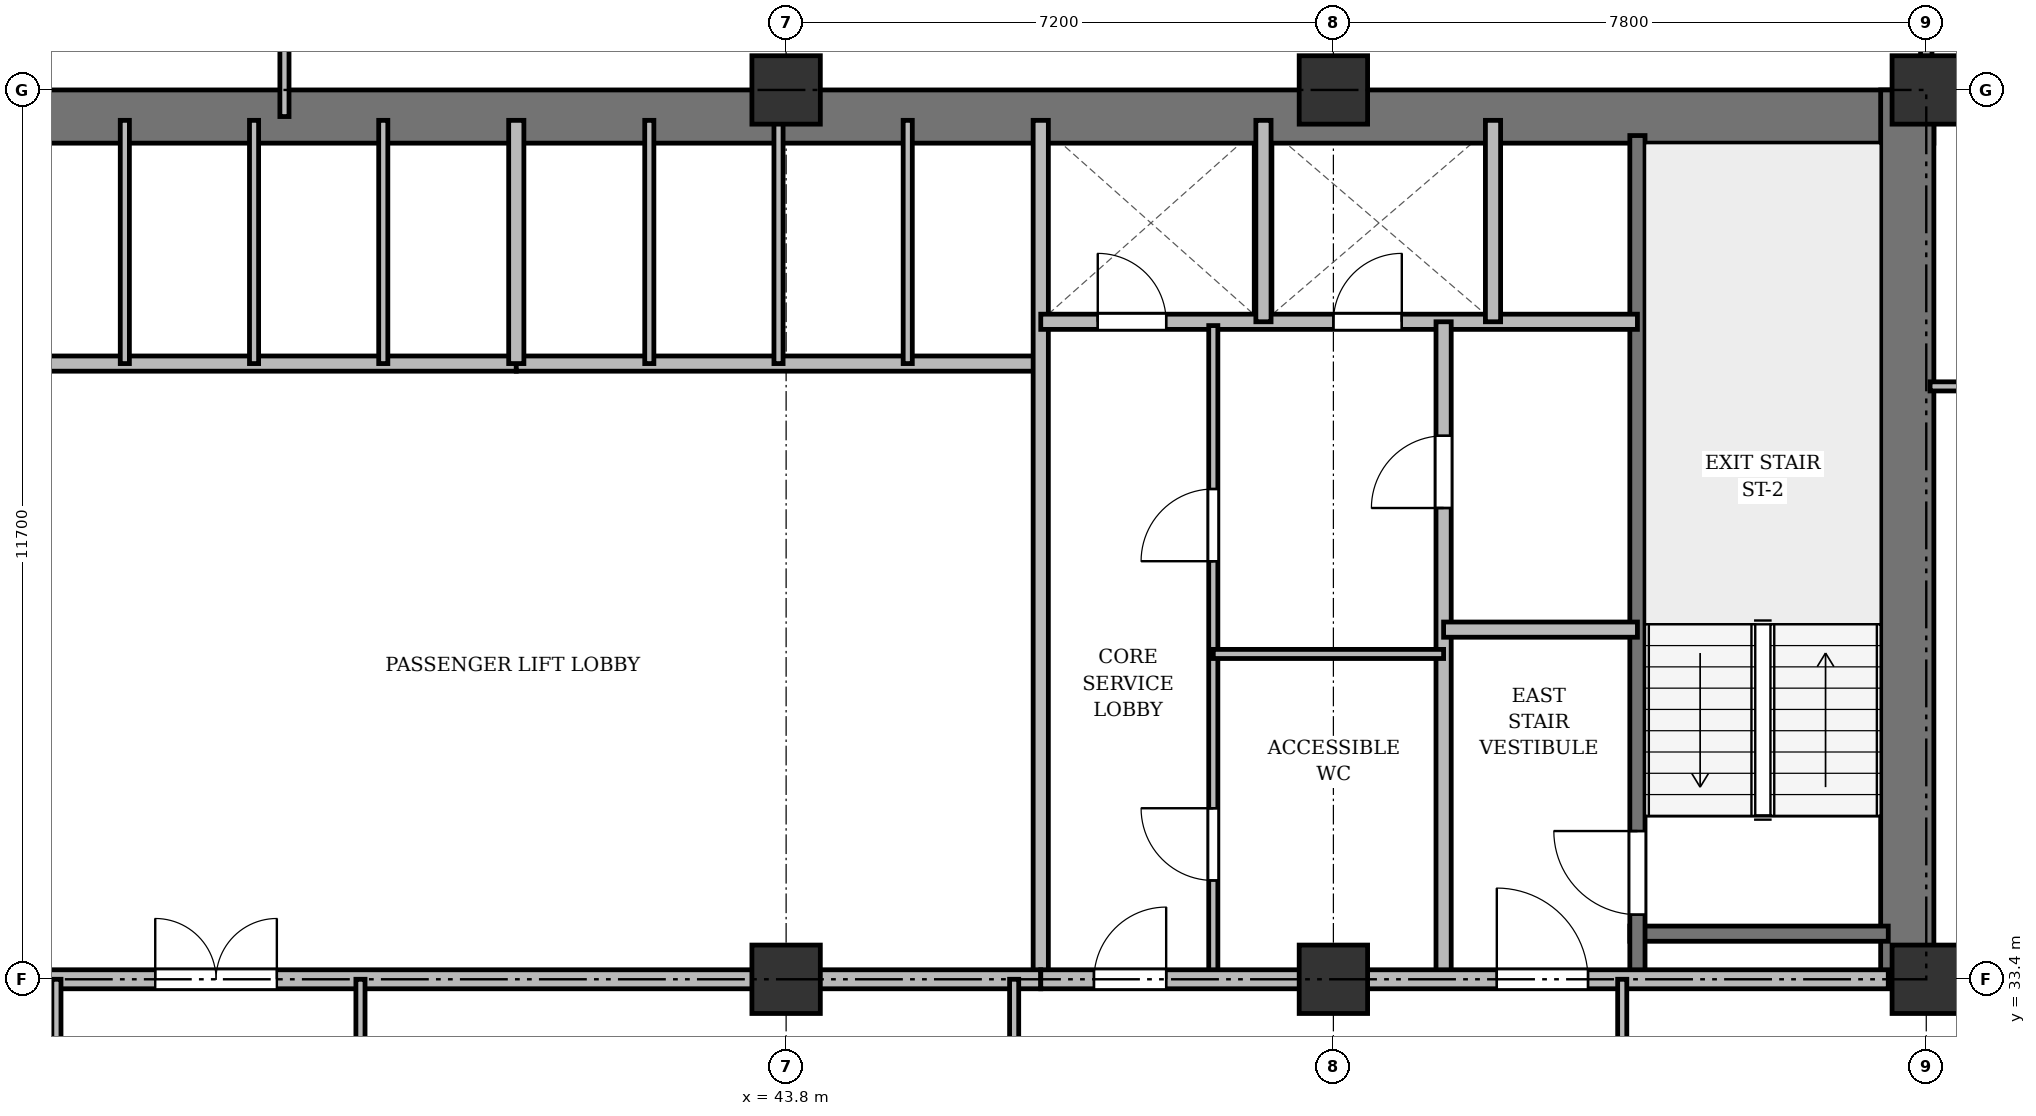
"""IFC4 building model, lengths in metres.
Left out: names, types, materials, properties, quantities, classifications, styles, units other than length and angle.
Written with IfcOpenShell. Run it as: python <this file> out.ifc"""

import sys

from ifc_helpers import new_model, si_unit, direction, frame, frame_2d, origin, origin_2d, place, context, subcontext, project, spatial, rectangle, extrude, source, transform, mapped, element, fill, save


model = new_model("IFC4")
c1 = context("Model", 3, precision=1e-05, world=origin(), true_north=direction((0.0, 1.0)))
c2 = subcontext(c1, "Body", "Model", "MODEL_VIEW")
j1 = project(units=[si_unit("LENGTHUNIT", "METRE"), si_unit("PLANEANGLEUNIT", "RADIAN")], contexts=[c1])
p1 = place(None, origin())
s1 = spatial("IfcSite", under=j1, at=p1, CompositionType="ELEMENT")
p2 = place(p1, origin())
s2 = spatial("IfcBuilding", under=s1, at=p2, CompositionType="ELEMENT")
p3 = place(p2, frame((0.0, 0.0, 70.3)))
s3 = spatial("IfcBuildingStorey", under=s2, at=p3, CompositionType="ELEMENT", Elevation=70.3)
m1 = source(origin(), c2, "Body", "SweptSolid", [
    extrude(rectangle(XDim=0.9, YDim=0.9, at=origin_2d()), origin(), (0.0, 0.0, 1.0), 3.6),
])
for number, where, z_axis, x_axis in (
    (1, (43.8, 33.4, 0.0), (0.0, 0.0, 1.0), (1.0, 0.0, 0.0)),
    (2, (43.8, 45.1, 0.0), (0.0, 0.0, 1.0), (1.0, 0.0, 0.0)),
    (3, (51.0, 33.4, 0.0), (0.0, 0.0, 1.0), (1.0, 0.0, 0.0)),
    (4, (51.0, 45.1, 0.0), (0.0, 0.0, 1.0), (1.0, 0.0, 0.0)),
    (5, (58.8, 33.4, 0.0), (0.0, 0.0, 1.0), (1.0, 0.0, 0.0)),
    (6, (58.8, 45.1, 0.0), (0.0, 0.0, 1.0), (1.0, 0.0, 0.0)),
):
    element("IfcColumn", number, at=place(p3, frame(where, z_axis=z_axis, x_axis=x_axis)), inside=s3, PredefinedType="COLUMN", context=c2, shape_type="MappedRepresentation", body=[
        mapped(m1, transform((0.0, 0.0, 0.0), x_axis=(1.0, 0.0, 0.0), y_axis=(0.0, 1.0, 0.0), z_axis=(0.0, 0.0, 1.0), scale=1.0)),
    ])
p4 = place(p3, frame((15.5, 44.75, 0.0), z_axis=(0.0, 0.0, 1.0), x_axis=(1.0, 0.0, 0.0)))
e7 = element("IfcWall", 7, at=p4, inside=s3, PredefinedType="SHEAR", context=c2, shape_type="SweptSolid", body=[
    extrude(rectangle(XDim=43.4, YDim=0.7, at=frame_2d((21.7, 0.0))), origin(), (0.0, 0.0, 1.0), 3.22),
])
p5 = place(p3, frame((58.55, 33.4, 0.0), z_axis=(0.0, 0.0, 1.0), x_axis=(0.0, 1.0, 0.0)))
e8 = element("IfcWall", 8, at=p5, inside=s3, PredefinedType="SHEAR", context=c2, shape_type="SweptSolid", body=[
    extrude(rectangle(XDim=11.7, YDim=0.7, at=frame_2d((5.85, 0.0))), origin(), (0.0, 0.0, 1.0), 3.22),
])
p6 = place(p3, frame((54.9, 34.0, 0.0), z_axis=(0.0, 0.0, 1.0), x_axis=(1.0, 0.0, 0.0)))
e9 = element("IfcWall", 9, at=p6, inside=s3, PredefinedType="SHEAR", context=c2, shape_type="SweptSolid", body=[
    extrude(rectangle(XDim=3.4, YDim=0.2, at=frame_2d((1.7, 0.0))), origin(), (0.0, 0.0, 1.0), 3.22),
])
p7 = place(p3, frame((55.0, 33.4, 0.0), z_axis=(0.0, 0.0, 1.0), x_axis=(0.0, 1.0, 0.0)))
e10 = element("IfcWall", 10, at=p7, inside=s3, PredefinedType="SHEAR", context=c2, shape_type="SweptSolid", body=[
    extrude(rectangle(XDim=11.1, YDim=0.2, at=frame_2d((5.55, 0.0))), origin(), (0.0, 0.0, 1.0), 3.22),
])
p8 = place(p7, frame((0.85, 0.0, 0.0)))
e11 = element("IfcOpeningElement", 11, at=p8, cuts=e10, PredefinedType="OPENING", context=c2, shape_type="SweptSolid", body=[
    extrude(rectangle(XDim=1.1, YDim=2.15, at=frame_2d((0.55, 1.075))), frame((0.0, 0.11, 0.0), z_axis=(0.0, -1.0, 0.0), x_axis=(1.0, 0.0, 0.0)), (0.0, 0.0, 1.0), 0.22),
])
p9 = place(p3, frame((33.35, 41.5, 0.0), z_axis=(0.0, 0.0, 1.0), x_axis=(1.0, 0.0, 0.0)))
e12 = element("IfcWall", 12, at=p9, inside=s3, PredefinedType="SOLIDWALL", context=c2, shape_type="SweptSolid", body=[
    extrude(rectangle(XDim=6.9, YDim=0.2, at=frame_2d((3.45, 0.0))), origin(), (0.0, 0.0, 1.0), 3.22),
])
for number, where, z_axis, x_axis in (
    (13, (35.1, 41.5, 0.0), (0.0, 0.0, 1.0), (0.0, 1.0, 0.0)),
    (14, (36.8, 41.5, 0.0), (0.0, 0.0, 1.0), (0.0, 1.0, 0.0)),
    (15, (38.5, 41.5, 0.0), (0.0, 0.0, 1.0), (0.0, 1.0, 0.0)),
):
    element("IfcWall", number, at=place(p3, frame(where, z_axis=z_axis, x_axis=x_axis)), inside=s3, PredefinedType="PARTITIONING", context=c2, shape_type="SweptSolid", body=[
        extrude(rectangle(XDim=3.2, YDim=0.12, at=frame_2d((1.6, 0.0))), origin(), (0.0, 0.0, 1.0), 3.22),
    ])
p10 = place(p3, frame((40.25, 41.5, 0.0), z_axis=(0.0, 0.0, 1.0), x_axis=(1.0, 0.0, 0.0)))
e16 = element("IfcWall", 16, at=p10, inside=s3, PredefinedType="SOLIDWALL", context=c2, shape_type="SweptSolid", body=[
    extrude(rectangle(XDim=6.9, YDim=0.2, at=frame_2d((3.45, 0.0))), origin(), (0.0, 0.0, 1.0), 2.632),
])
p11 = place(p3, frame((40.25, 41.5, 0.0), z_axis=(0.0, 0.0, 1.0), x_axis=(0.0, 1.0, 0.0)))
e17 = element("IfcWall", 17, at=p11, inside=s3, PredefinedType="SOLIDWALL", context=c2, shape_type="SweptSolid", body=[
    extrude(rectangle(XDim=3.2, YDim=0.2, at=frame_2d((1.6, 0.0))), origin(), (0.0, 0.0, 1.0), 3.22),
])
p12 = place(p3, frame((42.0, 41.5, 0.0), z_axis=(0.0, 0.0, 1.0), x_axis=(0.0, 1.0, 0.0)))
e18 = element("IfcWall", 18, at=p12, inside=s3, PredefinedType="PARTITIONING", context=c2, shape_type="SweptSolid", body=[
    extrude(rectangle(XDim=3.2, YDim=0.12, at=frame_2d((1.6, 0.0))), origin(), (0.0, 0.0, 1.0), 3.22),
])
p13 = place(p3, frame((43.7, 41.5, 0.0), z_axis=(0.0, 0.0, 1.0), x_axis=(0.0, 1.0, 0.0)))
e19 = element("IfcWall", 19, at=p13, inside=s3, PredefinedType="PARTITIONING", context=c2, shape_type="SweptSolid", body=[
    extrude(rectangle(XDim=3.2, YDim=0.12, at=frame_2d((1.6, 0.0))), origin(), (0.0, 0.0, 1.0), 2.632),
])
p14 = place(p3, frame((45.4, 41.5, 0.0), z_axis=(0.0, 0.0, 1.0), x_axis=(0.0, 1.0, 0.0)))
e20 = element("IfcWall", 20, at=p14, inside=s3, PredefinedType="PARTITIONING", context=c2, shape_type="SweptSolid", body=[
    extrude(rectangle(XDim=3.2, YDim=0.12, at=frame_2d((1.6, 0.0))), origin(), (0.0, 0.0, 1.0), 3.22),
])
p15 = place(p3, frame((47.15, 33.4, 0.0), z_axis=(0.0, 0.0, 1.0), x_axis=(0.0, 1.0, 0.0)))
e21 = element("IfcWall", 21, at=p15, inside=s3, PredefinedType="SOLIDWALL", context=c2, shape_type="SweptSolid", body=[
    extrude(rectangle(XDim=11.3, YDim=0.2, at=frame_2d((5.65, 0.0))), origin(), (0.0, 0.0, 1.0), 2.57),
])
p16 = place(p3, frame((26.3, 33.4, 0.0), z_axis=(0.0, 0.0, 1.0), x_axis=(1.0, 0.0, 0.0)))
e22 = element("IfcWall", 22, at=p16, inside=s3, PredefinedType="PARTITIONING", context=c2, shape_type="SweptSolid", body=[
    extrude(rectangle(XDim=20.85, YDim=0.25, at=frame_2d((10.425, 0.0))), origin(), (0.0, 0.0, 1.0), 2.57),
])
p17 = place(p16, frame((9.2, 0.0, 0.0)))
e23 = element("IfcOpeningElement", 23, at=p17, cuts=e22, PredefinedType="OPENING", context=c2, shape_type="SweptSolid", body=[
    extrude(rectangle(XDim=1.6, YDim=2.2, at=frame_2d((0.8, 1.1))), frame((0.0, 0.135, 0.0), z_axis=(0.0, -1.0, 0.0), x_axis=(1.0, 0.0, 0.0)), (0.0, 0.0, 1.0), 0.27),
])
p18 = place(p3, frame((47.15, 42.05, 0.0), z_axis=(0.0, 0.0, 1.0), x_axis=(1.0, 0.0, 0.0)))
e24 = element("IfcWall", 24, at=p18, inside=s3, PredefinedType="SOLIDWALL", context=c2, shape_type="SweptSolid", body=[
    extrude(rectangle(XDim=7.85, YDim=0.2, at=frame_2d((3.925, 0.0))), origin(), (0.0, 0.0, 1.0), 2.632),
])
p19 = place(p18, frame((0.75, 0.0, 0.0)))
e25 = element("IfcOpeningElement", 25, at=p19, cuts=e24, PredefinedType="OPENING", context=c2, shape_type="SweptSolid", body=[
    extrude(rectangle(XDim=0.9, YDim=2.1, at=frame_2d((0.45, 1.05))), frame((0.0, 0.11, 0.0), z_axis=(0.0, -1.0, 0.0), x_axis=(1.0, 0.0, 0.0)), (0.0, 0.0, 1.0), 0.22),
])
p20 = place(p18, frame((3.85, 0.0, 0.0)))
e26 = element("IfcOpeningElement", 26, at=p20, cuts=e24, PredefinedType="OPENING", context=c2, shape_type="SweptSolid", body=[
    extrude(rectangle(XDim=0.9, YDim=2.1, at=frame_2d((0.45, 1.05))), frame((0.0, 0.11, 0.0), z_axis=(0.0, -1.0, 0.0), x_axis=(1.0, 0.0, 0.0)), (0.0, 0.0, 1.0), 0.22),
])
for number, where, z_axis, x_axis in (
    (27, (50.08, 42.05, 0.0), (0.0, 0.0, 1.0), (0.0, 1.0, 0.0)),
    (28, (53.1, 42.05, 0.0), (0.0, 0.0, 1.0), (0.0, 1.0, 0.0)),
):
    element("IfcWall", number, at=place(p3, frame(where, z_axis=z_axis, x_axis=x_axis)), inside=s3, PredefinedType="SOLIDWALL", context=c2, shape_type="SweptSolid", body=[
        extrude(rectangle(XDim=2.65, YDim=0.2, at=frame_2d((1.325, 0.0))), origin(), (0.0, 0.0, 1.0), 3.22),
    ])
p21 = place(p3, frame((52.45, 33.4, 0.0), z_axis=(0.0, 0.0, 1.0), x_axis=(0.0, 1.0, 0.0)))
e29 = element("IfcWall", 29, at=p21, inside=s3, PredefinedType="PARTITIONING", context=c2, shape_type="SweptSolid", body=[
    extrude(rectangle(XDim=8.65, YDim=0.2, at=frame_2d((4.325, 0.0))), origin(), (0.0, 0.0, 1.0), 2.57),
])
p22 = place(p21, frame((6.2, 0.0, 0.0)))
e30 = element("IfcOpeningElement", 30, at=p22, cuts=e29, PredefinedType="OPENING", context=c2, shape_type="SweptSolid", body=[
    extrude(rectangle(XDim=0.95, YDim=2.15, at=frame_2d((0.475, 1.075))), frame((0.0, 0.11, 0.0), z_axis=(0.0, -1.0, 0.0), x_axis=(1.0, 0.0, 0.0)), (0.0, 0.0, 1.0), 0.22),
])
p23 = place(p3, frame((52.45, 38.0, 0.0), z_axis=(0.0, 0.0, 1.0), x_axis=(1.0, 0.0, 0.0)))
e31 = element("IfcWall", 31, at=p23, inside=s3, PredefinedType="PARTITIONING", context=c2, shape_type="SweptSolid", body=[
    extrude(rectangle(XDim=2.55, YDim=0.2, at=frame_2d((1.275, 0.0))), origin(), (0.0, 0.0, 1.0), 3.22),
])
p24 = place(p3, frame((49.42, 33.4, 0.0), z_axis=(0.0, 0.0, 1.0), x_axis=(0.0, 1.0, 0.0)))
e32 = element("IfcWall", 32, at=p24, inside=s3, PredefinedType="PARTITIONING", context=c2, shape_type="SweptSolid", body=[
    extrude(rectangle(XDim=8.6, YDim=0.12, at=frame_2d((4.3, 0.0))), origin(), (0.0, 0.0, 1.0), 2.57),
])
p25 = place(p24, frame((1.3, 0.0, 0.0)))
e33 = element("IfcOpeningElement", 33, at=p25, cuts=e32, PredefinedType="OPENING", context=c2, shape_type="SweptSolid", body=[
    extrude(rectangle(XDim=0.95, YDim=2.15, at=frame_2d((0.475, 1.075))), frame((0.0, 0.07, 0.0), z_axis=(0.0, -1.0, 0.0), x_axis=(1.0, 0.0, 0.0)), (0.0, 0.0, 1.0), 0.14),
])
p26 = place(p24, frame((5.5, 0.0, 0.0)))
e34 = element("IfcOpeningElement", 34, at=p26, cuts=e32, PredefinedType="OPENING", context=c2, shape_type="SweptSolid", body=[
    extrude(rectangle(XDim=0.95, YDim=2.15, at=frame_2d((0.475, 1.075))), frame((0.0, 0.07, 0.0), z_axis=(0.0, -1.0, 0.0), x_axis=(1.0, 0.0, 0.0)), (0.0, 0.0, 1.0), 0.14),
])
p27 = place(p3, frame((49.42, 37.68, 0.0), z_axis=(0.0, 0.0, 1.0), x_axis=(1.0, 0.0, 0.0)))
e35 = element("IfcWall", 35, at=p27, inside=s3, PredefinedType="PARTITIONING", context=c2, shape_type="SweptSolid", body=[
    extrude(rectangle(XDim=3.03, YDim=0.12, at=frame_2d((1.515, 0.0))), origin(), (0.0, 0.0, 1.0), 2.632),
])
p28 = place(p3, frame((47.15, 33.4, 0.0), z_axis=(0.0, 0.0, 1.0), x_axis=(1.0, 0.0, 0.0)))
e36 = element("IfcWall", 36, at=p28, inside=s3, PredefinedType="PARTITIONING", context=c2, shape_type="SweptSolid", body=[
    extrude(rectangle(XDim=11.15, YDim=0.25, at=frame_2d((5.575, 0.0))), origin(), (0.0, 0.0, 1.0), 2.57),
])
p29 = place(p28, frame((0.7, 0.0, 0.0)))
e37 = element("IfcOpeningElement", 37, at=p29, cuts=e36, PredefinedType="OPENING", context=c2, shape_type="SweptSolid", body=[
    extrude(rectangle(XDim=0.95, YDim=2.15, at=frame_2d((0.475, 1.075))), frame((0.0, 0.135, 0.0), z_axis=(0.0, -1.0, 0.0), x_axis=(1.0, 0.0, 0.0)), (0.0, 0.0, 1.0), 0.27),
])
p30 = place(p28, frame((6.0, 0.0, 0.0)))
e38 = element("IfcOpeningElement", 38, at=p30, cuts=e36, PredefinedType="OPENING", context=c2, shape_type="SweptSolid", body=[
    extrude(rectangle(XDim=1.2, YDim=2.15, at=frame_2d((0.6, 1.075))), frame((0.0, 0.135, 0.0), z_axis=(0.0, -1.0, 0.0), x_axis=(1.0, 0.0, 0.0)), (0.0, 0.0, 1.0), 0.27),
])
for number, where, z_axis, x_axis in (
    (39, (34.2, 29.8, 0.0), (0.0, 0.0, 1.0), (0.0, 1.0, 0.0)),
    (40, (38.2, 29.8, 0.0), (0.0, 0.0, 1.0), (0.0, 1.0, 0.0)),
    (41, (46.8, 29.8, 0.0), (0.0, 0.0, 1.0), (0.0, 1.0, 0.0)),
    (42, (54.8, 29.8, 0.0), (0.0, 0.0, 1.0), (0.0, 1.0, 0.0)),
):
    element("IfcWall", number, at=place(p3, frame(where, z_axis=z_axis, x_axis=x_axis)), inside=s3, PredefinedType="PARTITIONING", context=c2, shape_type="SweptSolid", body=[
        extrude(rectangle(XDim=3.6, YDim=0.12, at=frame_2d((1.8, 0.0))), origin(), (0.0, 0.0, 1.0), 2.57),
    ])
p31 = place(p3, frame((58.85, 41.2, 0.0), z_axis=(0.0, 0.0, 1.0), x_axis=(1.0, 0.0, 0.0)))
e43 = element("IfcWall", 43, at=p31, inside=s3, PredefinedType="PARTITIONING", context=c2, shape_type="SweptSolid", body=[
    extrude(rectangle(XDim=10.75, YDim=0.12, at=frame_2d((5.375, 0.0))), origin(), (0.0, 0.0, 1.0), 2.632),
])
p32 = place(p31, frame((4.9, 0.0, 0.0)))
e44 = element("IfcOpeningElement", 44, at=p32, cuts=e43, PredefinedType="OPENING", context=c2, shape_type="SweptSolid", body=[
    extrude(rectangle(XDim=0.95, YDim=2.15, at=frame_2d((0.475, 1.075))), frame((0.0, 0.07, 0.0), z_axis=(0.0, -1.0, 0.0), x_axis=(1.0, 0.0, 0.0)), (0.0, 0.0, 1.0), 0.14),
])
p33 = place(p3, frame((58.8, 33.4, 0.0), z_axis=(0.0, 0.0, 1.0), x_axis=(1.0, 0.0, 0.0)))
e45 = element("IfcWall", 45, at=p33, inside=s3, PredefinedType="PARTITIONING", context=c2, shape_type="SweptSolid", body=[
    extrude(rectangle(XDim=10.85, YDim=0.15, at=frame_2d((5.425, 0.0))), origin(), (0.0, 0.0, 1.0), 2.57),
])
p34 = place(p33, frame((4.76, 0.0, 0.0)))
e46 = element("IfcOpeningElement", 46, at=p34, cuts=e45, PredefinedType="OPENING", context=c2, shape_type="SweptSolid", body=[
    extrude(rectangle(XDim=0.95, YDim=2.15, at=frame_2d((0.475, 1.075))), frame((0.0, 0.085, 0.0), z_axis=(0.0, -1.0, 0.0), x_axis=(1.0, 0.0, 0.0)), (0.0, 0.0, 1.0), 0.17),
])
p35 = place(p3, frame((37.2, 44.75, 0.0), z_axis=(0.0, 0.0, 1.0), x_axis=(0.0, 1.0, 0.0)))
e47 = element("IfcWall", 47, at=p35, inside=s3, PredefinedType="PARTITIONING", context=c2, shape_type="SweptSolid", body=[
    extrude(rectangle(XDim=3.61, YDim=0.12, at=frame_2d((1.805, 0.0))), origin(), (0.0, 0.0, 1.0), 2.57),
])
p36 = place(p35, frame((1.1, 0.0, 0.0)))
e48 = element("IfcOpeningElement", 48, at=p36, cuts=e47, PredefinedType="OPENING", context=c2, shape_type="SweptSolid", body=[
    extrude(rectangle(XDim=0.95, YDim=2.15, at=frame_2d((0.475, 1.075))), frame((0.0, 0.07, 0.0), z_axis=(0.0, -1.0, 0.0), x_axis=(1.0, 0.0, 0.0)), (0.0, 0.0, 1.0), 0.14),
])
p37 = place(p3, frame((58.8, 44.75, 0.0), z_axis=(0.0, 0.0, 1.0), x_axis=(0.0, 1.0, 0.0)))
e49 = element("IfcWall", 49, at=p37, inside=s3, PredefinedType="PARTITIONING", context=c2, shape_type="SweptSolid", body=[
    extrude(rectangle(XDim=3.61, YDim=0.15, at=frame_2d((1.805, 0.0))), origin(), (0.0, 0.0, 1.0), 2.632),
])
p38 = place(p37, frame((1.1, 0.0, 0.0)))
e50 = element("IfcOpeningElement", 50, at=p38, cuts=e49, PredefinedType="OPENING", context=c2, shape_type="SweptSolid", body=[
    extrude(rectangle(XDim=0.95, YDim=2.15, at=frame_2d((0.475, 1.075))), frame((0.0, 0.085, 0.0), z_axis=(0.0, -1.0, 0.0), x_axis=(1.0, 0.0, 0.0)), (0.0, 0.0, 1.0), 0.17),
])
m2 = source(origin(), c2, "Body", "SweptSolid", [
    extrude(rectangle(XDim=1.1, YDim=2.15, at=frame_2d((0.55, 1.075))), frame((0.0, 0.025, 0.0), z_axis=(0.0, -1.0, 0.0), x_axis=(1.0, 0.0, 0.0)), (0.0, 0.0, 1.0), 0.05),
])
p39 = place(p8, origin())
e51 = element("IfcDoor", 51, at=p39, inside=s3, OperationType="SINGLE_SWING_RIGHT", PredefinedType="DOOR", context=c2, shape_type="MappedRepresentation", body=[
    mapped(m2, transform((0.0, 0.0, 0.0), x_axis=(1.0, 0.0, 0.0), y_axis=(0.0, 1.0, 0.0), z_axis=(0.0, 0.0, 1.0), scale=1.0)),
])
fill(e11, e51)
m3 = source(origin(), c2, "Body", "SweptSolid", [
    extrude(rectangle(XDim=1.6, YDim=2.2, at=frame_2d((0.8, 1.1))), frame((0.0, 0.025, 0.0), z_axis=(0.0, -1.0, 0.0), x_axis=(1.0, 0.0, 0.0)), (0.0, 0.0, 1.0), 0.05),
])
p40 = place(p17, origin())
e52 = element("IfcDoor", 52, at=p40, inside=s3, OperationType="DOUBLE_DOOR_SINGLE_SWING", PredefinedType="DOOR", context=c2, shape_type="MappedRepresentation", body=[
    mapped(m3, transform((0.0, 0.0, 0.0), x_axis=(1.0, 0.0, 0.0), y_axis=(0.0, 1.0, 0.0), z_axis=(0.0, 0.0, 1.0), scale=1.0)),
])
fill(e23, e52)
m4 = source(origin(), c2, "Body", "SweptSolid", [
    extrude(rectangle(XDim=0.9, YDim=2.1, at=frame_2d((0.45, 1.05))), frame((0.0, 0.025, 0.0), z_axis=(0.0, -1.0, 0.0), x_axis=(1.0, 0.0, 0.0)), (0.0, 0.0, 1.0), 0.05),
])
p41 = place(p19, origin())
e53 = element("IfcDoor", 53, at=p41, inside=s3, OperationType="SINGLE_SWING_LEFT", PredefinedType="DOOR", context=c2, shape_type="MappedRepresentation", body=[
    mapped(m4, transform((0.0, 0.0, 0.0), x_axis=(1.0, 0.0, 0.0), y_axis=(0.0, 1.0, 0.0), z_axis=(0.0, 0.0, 1.0), scale=1.0)),
])
fill(e25, e53)
p42 = place(p20, origin())
e54 = element("IfcDoor", 54, at=p42, inside=s3, OperationType="SINGLE_SWING_RIGHT", PredefinedType="DOOR", context=c2, shape_type="MappedRepresentation", body=[
    mapped(m4, transform((0.0, 0.0, 0.0), x_axis=(1.0, 0.0, 0.0), y_axis=(0.0, 1.0, 0.0), z_axis=(0.0, 0.0, 1.0), scale=1.0)),
])
fill(e26, e54)
m5 = source(origin(), c2, "Body", "SweptSolid", [
    extrude(rectangle(XDim=0.95, YDim=2.15, at=frame_2d((0.475, 1.075))), frame((0.0, 0.025, 0.0), z_axis=(0.0, -1.0, 0.0), x_axis=(1.0, 0.0, 0.0)), (0.0, 0.0, 1.0), 0.05),
])
p43 = place(p22, origin())
e55 = element("IfcDoor", 55, at=p43, inside=s3, OperationType="SINGLE_SWING_LEFT", PredefinedType="DOOR", context=c2, shape_type="MappedRepresentation", body=[
    mapped(m5, transform((0.0, 0.0, 0.0), x_axis=(1.0, 0.0, 0.0), y_axis=(0.0, 1.0, 0.0), z_axis=(0.0, 0.0, 1.0), scale=1.0)),
])
fill(e30, e55)
p44 = place(p25, origin())
e56 = element("IfcDoor", 56, at=p44, inside=s3, OperationType="SINGLE_SWING_RIGHT", PredefinedType="DOOR", context=c2, shape_type="MappedRepresentation", body=[
    mapped(m5, transform((0.0, 0.0, 0.0), x_axis=(1.0, 0.0, 0.0), y_axis=(0.0, 1.0, 0.0), z_axis=(0.0, 0.0, 1.0), scale=1.0)),
])
fill(e33, e56)
p45 = place(p26, origin())
e57 = element("IfcDoor", 57, at=p45, inside=s3, OperationType="SINGLE_SWING_LEFT", PredefinedType="DOOR", context=c2, shape_type="MappedRepresentation", body=[
    mapped(m5, transform((0.0, 0.0, 0.0), x_axis=(1.0, 0.0, 0.0), y_axis=(0.0, 1.0, 0.0), z_axis=(0.0, 0.0, 1.0), scale=1.0)),
])
fill(e34, e57)
p46 = place(p29, origin())
e58 = element("IfcDoor", 58, at=p46, inside=s3, OperationType="SINGLE_SWING_RIGHT", PredefinedType="DOOR", context=c2, shape_type="MappedRepresentation", body=[
    mapped(m5, transform((0.0, 0.0, 0.0), x_axis=(1.0, 0.0, 0.0), y_axis=(0.0, 1.0, 0.0), z_axis=(0.0, 0.0, 1.0), scale=1.0)),
])
fill(e37, e58)
m6 = source(origin(), c2, "Body", "SweptSolid", [
    extrude(rectangle(XDim=1.2, YDim=2.15, at=frame_2d((0.6, 1.075))), frame((0.0, 0.025, 0.0), z_axis=(0.0, -1.0, 0.0), x_axis=(1.0, 0.0, 0.0)), (0.0, 0.0, 1.0), 0.05),
])
p47 = place(p30, origin())
e59 = element("IfcDoor", 59, at=p47, inside=s3, OperationType="SINGLE_SWING_LEFT", PredefinedType="DOOR", context=c2, shape_type="MappedRepresentation", body=[
    mapped(m6, transform((0.0, 0.0, 0.0), x_axis=(1.0, 0.0, 0.0), y_axis=(0.0, 1.0, 0.0), z_axis=(0.0, 0.0, 1.0), scale=1.0)),
])
fill(e38, e59)
save(model, sys.argv[1])
